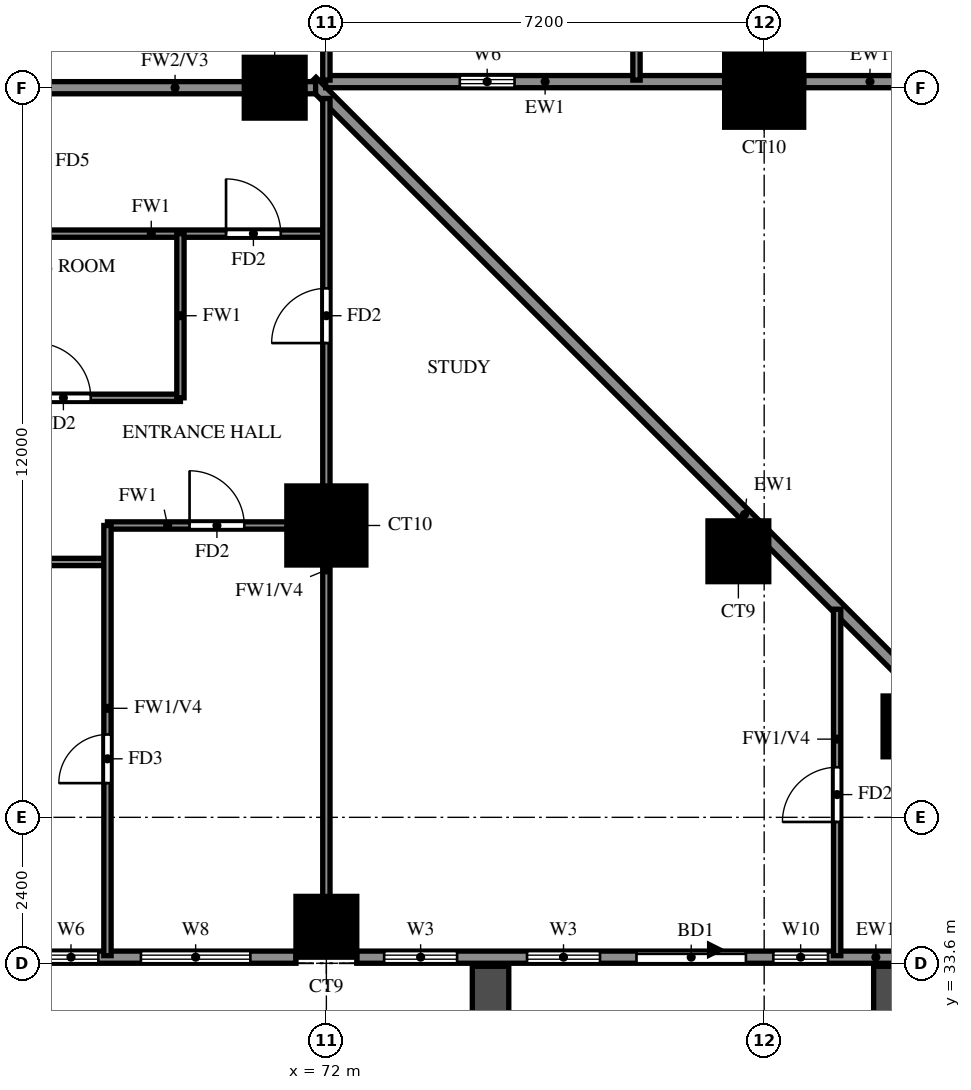
"""IFC4 building model, lengths in metres.
Left out: names, types, materials, properties, quantities, classifications, styles, units other than length and angle.
Written with IfcOpenShell. Run it as: python <this file> out.ifc"""

import sys

from ifc_helpers import new_model, si_unit, direction, frame, frame_2d, origin, origin_2d, place, context, subcontext, project, spatial, rectangle, extrude, source, transform, mapped, element, fill, save


model = new_model("IFC4")
c1 = context("Model", 3, precision=1e-05, world=origin(), true_north=direction((0.0, 1.0)))
c2 = subcontext(c1, "Body", "Model", "MODEL_VIEW")
j1 = project(units=[si_unit("LENGTHUNIT", "METRE"), si_unit("PLANEANGLEUNIT", "RADIAN")], contexts=[c1])
p1 = place(None, origin())
s1 = spatial("IfcSite", under=j1, at=p1, CompositionType="ELEMENT")
p2 = place(p1, origin())
s2 = spatial("IfcBuilding", under=s1, at=p2, CompositionType="ELEMENT")
p3 = place(p2, frame((0.0, 0.0, 79.5)))
s3 = spatial("IfcBuildingStorey", under=s2, at=p3, CompositionType="ELEMENT", Elevation=79.5)
m1 = source(origin(), c2, "Body", "SweptSolid", [
    extrude(rectangle(XDim=1.0, YDim=1.0, at=origin_2d()), origin(), (0.0, 0.0, 1.0), 3.18),
])
for number, where, z_axis, x_axis in (
    (1, (72.0, 34.2, 0.0), (0.0, 0.0, 1.0), (1.0, 0.0, 0.0)),
    (2, (81.656, 37.496, 0.0), (0.0, 0.0, 1.0), (1.0, 0.0, 0.0)),
    (3, (78.776, 40.376, 0.0), (0.0, 0.0, 1.0), (1.0, 0.0, 0.0)),
):
    element("IfcColumn", number, at=place(p3, frame(where, z_axis=z_axis, x_axis=x_axis)), inside=s3, PredefinedType="COLUMN", context=c2, shape_type="MappedRepresentation", body=[
        mapped(m1, transform((0.0, 0.0, 0.0))),
    ])
m2 = source(origin(), c2, "Body", "SweptSolid", [
    extrude(rectangle(XDim=1.3, YDim=1.3, at=origin_2d()), origin(), (0.0, 0.0, 1.0), 3.18),
])
p4 = place(p3, frame((72.0, 40.8, 0.0), z_axis=(0.0, 0.0, 1.0), x_axis=(1.0, 0.0, 0.0)))
e4 = element("IfcColumn", 4, at=p4, inside=s3, PredefinedType="COLUMN", context=c2, shape_type="MappedRepresentation", body=[
    mapped(m2, transform((0.0, 0.0, 0.0))),
])
p5 = place(p3, frame((71.15, 48.0, 0.0), z_axis=(0.0, 0.0, 1.0), x_axis=(1.0, 0.0, 0.0)))
e5 = element("IfcColumn", 5, at=p5, inside=s3, PredefinedType="COLUMN", context=c2, shape_type="MappedRepresentation", body=[
    mapped(m1, transform((0.0, 0.0, 0.0))),
])
p6 = place(p3, frame((79.2, 48.0, 0.0), z_axis=(0.0, 0.0, 1.0), x_axis=(1.0, 0.0, 0.0)))
e6 = element("IfcColumn", 6, at=p6, inside=s3, PredefinedType="COLUMN", context=c2, shape_type="MappedRepresentation", body=[
    mapped(m2, transform((0.0, 0.0, 0.0))),
])
p7 = place(p3, frame((85.996, 33.863, 0.0), z_axis=(0.0, 0.0, 1.0), x_axis=(-0.707100718496, 0.707112843825, 0.0)))
e7 = element("IfcWall", 7, at=p7, inside=s3, PredefinedType="SOLIDWALL", context=c2, shape_type="SweptSolid", body=[
    extrude(rectangle(XDim=20.135, YDim=0.2, at=frame_2d((10.067, 0.0))), origin(), (0.0, 0.0, 1.0), 3.18),
])
p8 = place(p3, frame((71.989, 48.1, 0.0), z_axis=(0.0, 0.0, 1.0), x_axis=(1.0, 0.0, 0.0)))
e8 = element("IfcWall", 8, at=p8, inside=s3, PredefinedType="SOLIDWALL", context=c2, shape_type="SweptSolid", body=[
    extrude(rectangle(XDim=6.562, YDim=0.2, at=frame_2d((3.281, 0.0))), origin(), (0.0, 0.0, 1.0), 3.18),
])
p9 = place(p8, frame((2.206, 0.0, 1.5)))
e9 = element("IfcOpeningElement", 9, at=p9, cuts=e8, PredefinedType="OPENING", context=c2, shape_type="SweptSolid", body=[
    extrude(rectangle(XDim=0.9, YDim=0.9, at=frame_2d((0.45, 0.45))), frame((0.0, 0.11, 0.0), z_axis=(0.0, -1.0, 0.0), x_axis=(1.0, 0.0, 0.0)), (0.0, 0.0, 1.0), 0.22),
])
p10 = place(p3, frame((79.85, 48.1, 0.0), z_axis=(0.0, 0.0, 1.0), x_axis=(1.0, 0.0, 0.0)))
e10 = element("IfcWall", 10, at=p10, inside=s3, PredefinedType="SOLIDWALL", context=c2, shape_type="SweptSolid", body=[
    extrude(rectangle(XDim=5.45, YDim=0.2, at=frame_2d((2.725, 0.0))), origin(), (0.0, 0.0, 1.0), 3.18),
])
p11 = place(p10, frame((1.525, 0.0, 0.6)))
e11 = element("IfcOpeningElement", 11, at=p11, cuts=e10, PredefinedType="OPENING", context=c2, shape_type="SweptSolid", body=[
    extrude(rectangle(XDim=2.4, YDim=2.4, at=frame_2d((1.2, 1.2))), frame((0.0, 0.11, 0.0), z_axis=(0.0, -1.0, 0.0), x_axis=(1.0, 0.0, 0.0)), (0.0, 0.0, 1.0), 0.22),
])
p12 = place(p3, frame((65.3, 33.7, 0.0), z_axis=(0.0, 0.0, 1.0), x_axis=(1.0, 0.0, 0.0)))
e12 = element("IfcWall", 12, at=p12, inside=s3, PredefinedType="SOLIDWALL", context=c2, shape_type="SweptSolid", body=[
    extrude(rectangle(XDim=6.2, YDim=0.2, at=frame_2d((3.1, 0.0))), origin(), (0.0, 0.0, 1.0), 3.18),
])
p13 = place(p12, frame((3.65, 0.0, 0.6)))
e13 = element("IfcOpeningElement", 13, at=p13, cuts=e12, PredefinedType="OPENING", context=c2, shape_type="SweptSolid", body=[
    extrude(rectangle(XDim=1.8, YDim=2.4, at=frame_2d((0.9, 1.2))), frame((0.0, 0.11, 0.0), z_axis=(0.0, -1.0, 0.0), x_axis=(1.0, 0.0, 0.0)), (0.0, 0.0, 1.0), 0.22),
])
p14 = place(p12, frame((0.3, 0.0, 1.5)))
e14 = element("IfcOpeningElement", 14, at=p14, cuts=e12, PredefinedType="OPENING", context=c2, shape_type="SweptSolid", body=[
    extrude(rectangle(XDim=0.9, YDim=0.9, at=frame_2d((0.45, 0.45))), frame((0.0, 0.11, 0.0), z_axis=(0.0, -1.0, 0.0), x_axis=(1.0, 0.0, 0.0)), (0.0, 0.0, 1.0), 0.22),
])
p15 = place(p12, frame((2.05, 0.0, 1.5)))
e15 = element("IfcOpeningElement", 15, at=p15, cuts=e12, PredefinedType="OPENING", context=c2, shape_type="SweptSolid", body=[
    extrude(rectangle(XDim=0.9, YDim=0.9, at=frame_2d((0.45, 0.45))), frame((0.0, 0.11, 0.0), z_axis=(0.0, -1.0, 0.0), x_axis=(1.0, 0.0, 0.0)), (0.0, 0.0, 1.0), 0.22),
])
p16 = place(p3, frame((72.5, 33.7, 0.0), z_axis=(0.0, 0.0, 1.0), x_axis=(1.0, 0.0, 0.0)))
e16 = element("IfcWall", 16, at=p16, inside=s3, PredefinedType="SOLIDWALL", context=c2, shape_type="SweptSolid", body=[
    extrude(rectangle(XDim=13.659, YDim=0.2, at=frame_2d((6.829, 0.0))), origin(), (0.0, 0.0, 1.0), 3.18),
])
p17 = place(p16, frame((4.6, 0.0, 0.0)))
e17 = element("IfcOpeningElement", 17, at=p17, cuts=e16, PredefinedType="OPENING", context=c2, shape_type="SweptSolid", body=[
    extrude(rectangle(XDim=1.8, YDim=2.4, at=frame_2d((0.9, 1.2))), frame((0.0, 0.11, 0.0), z_axis=(0.0, -1.0, 0.0), x_axis=(1.0, 0.0, 0.0)), (0.0, 0.0, 1.0), 0.22),
])
p18 = place(p16, frame((0.45, 0.0, 0.6)))
e18 = element("IfcOpeningElement", 18, at=p18, cuts=e16, PredefinedType="OPENING", context=c2, shape_type="SweptSolid", body=[
    extrude(rectangle(XDim=1.2, YDim=2.4, at=frame_2d((0.6, 1.2))), frame((0.0, 0.11, 0.0), z_axis=(0.0, -1.0, 0.0), x_axis=(1.0, 0.0, 0.0)), (0.0, 0.0, 1.0), 0.22),
])
p19 = place(p16, frame((2.8, 0.0, 0.6)))
e19 = element("IfcOpeningElement", 19, at=p19, cuts=e16, PredefinedType="OPENING", context=c2, shape_type="SweptSolid", body=[
    extrude(rectangle(XDim=1.2, YDim=2.4, at=frame_2d((0.6, 1.2))), frame((0.0, 0.11, 0.0), z_axis=(0.0, -1.0, 0.0), x_axis=(1.0, 0.0, 0.0)), (0.0, 0.0, 1.0), 0.22),
])
p20 = place(p16, frame((6.85, 0.0, 0.6)))
e20 = element("IfcOpeningElement", 20, at=p20, cuts=e16, PredefinedType="OPENING", context=c2, shape_type="SweptSolid", body=[
    extrude(rectangle(XDim=0.9, YDim=2.4, at=frame_2d((0.45, 1.2))), frame((0.0, 0.11, 0.0), z_axis=(0.0, -1.0, 0.0), x_axis=(1.0, 0.0, 0.0)), (0.0, 0.0, 1.0), 0.22),
])
p21 = place(p16, frame((10.079, 0.0, 0.6)))
e21 = element("IfcOpeningElement", 21, at=p21, cuts=e16, PredefinedType="OPENING", context=c2, shape_type="SweptSolid", body=[
    extrude(rectangle(XDim=2.4, YDim=2.4, at=frame_2d((1.2, 1.2))), frame((0.0, 0.11, 0.0), z_axis=(0.0, -1.0, 0.0), x_axis=(1.0, 0.0, 0.0)), (0.0, 0.0, 1.0), 0.22),
])
for number, where, z_axis, x_axis in (
    (22, (74.7, 33.55, 0.0), (0.0, 0.0, 1.0), (0.0, -1.0, 0.0)),
    (23, (81.3, 33.55, 0.0), (0.0, 0.0, 1.0), (0.0, -1.0, 0.0)),
):
    element("IfcWall", number, at=place(p3, frame(where, z_axis=z_axis, x_axis=x_axis)), inside=s3, PredefinedType="SOLIDWALL", context=c2, shape_type="SweptSolid", body=[
        extrude(rectangle(XDim=2.65, YDim=0.6, at=frame_2d((1.325, 0.0))), origin(), (0.0, 0.0, 1.0), 2.85),
    ])
p22 = place(p3, frame((67.2, 48.0, 0.0), z_axis=(0.0, 0.0, 1.0), x_axis=(1.0, 0.0, 0.0)))
e24 = element("IfcWall", 24, at=p22, inside=s3, PredefinedType="SOLIDWALL", context=c2, shape_type="SweptSolid", body=[
    extrude(rectangle(XDim=4.623, YDim=0.2, at=frame_2d((2.312, 0.0))), origin(), (0.0, 0.0, 1.0), 3.18),
])
p23 = place(p3, frame((64.8, 40.2, 0.0), z_axis=(0.0, 0.0, 1.0), x_axis=(1.0, 0.0, 0.0)))
e25 = element("IfcWall", 25, at=p23, inside=s3, PredefinedType="PARTITIONING", context=c2, shape_type="SweptSolid", body=[
    extrude(rectangle(XDim=3.6, YDim=0.12, at=frame_2d((1.8, 0.0))), origin(), (0.0, 0.0, 1.0), 3.18),
])
p24 = place(p3, frame((68.4, 40.8, 0.0), z_axis=(0.0, 0.0, 1.0), x_axis=(1.0, 0.0, 0.0)))
e26 = element("IfcWall", 26, at=p24, inside=s3, PredefinedType="PARTITIONING", context=c2, shape_type="SweptSolid", body=[
    extrude(rectangle(XDim=3.6, YDim=0.12, at=frame_2d((1.8, 0.0))), origin(), (0.0, 0.0, 1.0), 3.18),
])
p25 = place(p24, frame((1.35, 0.0, 0.0)))
e27 = element("IfcOpeningElement", 27, at=p25, cuts=e26, PredefinedType="OPENING", context=c2, shape_type="SweptSolid", body=[
    extrude(rectangle(XDim=0.9, YDim=2.1, at=frame_2d((0.45, 1.05))), frame((0.0, 0.07, 0.0), z_axis=(0.0, -1.0, 0.0), x_axis=(1.0, 0.0, 0.0)), (0.0, 0.0, 1.0), 0.14),
])
p26 = place(p3, frame((60.0, 42.9, 0.0), z_axis=(0.0, 0.0, 1.0), x_axis=(1.0, 0.0, 0.0)))
e28 = element("IfcWall", 28, at=p26, inside=s3, PredefinedType="PARTITIONING", context=c2, shape_type="SweptSolid", body=[
    extrude(rectangle(XDim=9.6, YDim=0.12, at=frame_2d((4.8, 0.0))), origin(), (0.0, 0.0, 1.0), 3.18),
])
p27 = place(p26, frame((7.225, 0.0, 0.0)))
e29 = element("IfcOpeningElement", 29, at=p27, cuts=e28, PredefinedType="OPENING", context=c2, shape_type="SweptSolid", body=[
    extrude(rectangle(XDim=0.9, YDim=2.1, at=frame_2d((0.45, 1.05))), frame((0.0, 0.07, 0.0), z_axis=(0.0, -1.0, 0.0), x_axis=(1.0, 0.0, 0.0)), (0.0, 0.0, 1.0), 0.14),
])
p28 = place(p26, frame((2.425, 0.0, 0.0)))
e30 = element("IfcOpeningElement", 30, at=p28, cuts=e28, PredefinedType="OPENING", context=c2, shape_type="SweptSolid", body=[
    extrude(rectangle(XDim=0.9, YDim=2.1, at=frame_2d((0.45, 1.05))), frame((0.0, 0.07, 0.0), z_axis=(0.0, -1.0, 0.0), x_axis=(1.0, 0.0, 0.0)), (0.0, 0.0, 1.0), 0.14),
])
p29 = place(p3, frame((67.2, 45.6, 0.0), z_axis=(0.0, 0.0, 1.0), x_axis=(1.0, 0.0, 0.0)))
e31 = element("IfcWall", 31, at=p29, inside=s3, PredefinedType="PARTITIONING", context=c2, shape_type="SweptSolid", body=[
    extrude(rectangle(XDim=4.8, YDim=0.12, at=frame_2d((2.4, 0.0))), origin(), (0.0, 0.0, 1.0), 3.18),
])
p30 = place(p29, frame((3.15, 0.0, 0.0)))
e32 = element("IfcOpeningElement", 32, at=p30, cuts=e31, PredefinedType="OPENING", context=c2, shape_type="SweptSolid", body=[
    extrude(rectangle(XDim=0.9, YDim=2.1, at=frame_2d((0.45, 1.05))), frame((0.0, 0.07, 0.0), z_axis=(0.0, -1.0, 0.0), x_axis=(1.0, 0.0, 0.0)), (0.0, 0.0, 1.0), 0.14),
])
p31 = place(p3, frame((68.4, 33.725, 0.0), z_axis=(0.0, 0.0, 1.0), x_axis=(0.0, 1.0, 0.0)))
e33 = element("IfcWall", 33, at=p31, inside=s3, PredefinedType="PARTITIONING", context=c2, shape_type="SweptSolid", body=[
    extrude(rectangle(XDim=7.075, YDim=0.12, at=frame_2d((3.538, 0.0))), origin(), (0.0, 0.0, 1.0), 2.28),
])
p32 = place(p31, frame((2.837, 0.0, 0.0)))
e34 = element("IfcOpeningElement", 34, at=p32, cuts=e33, PredefinedType="OPENING", context=c2, shape_type="SweptSolid", body=[
    extrude(rectangle(XDim=0.8, YDim=2.1, at=frame_2d((0.4, 1.05))), frame((0.0, 0.07, 0.0), z_axis=(0.0, -1.0, 0.0), x_axis=(1.0, 0.0, 0.0)), (0.0, 0.0, 1.0), 0.14),
])
p33 = place(p3, frame((69.6, 42.9, 0.0), z_axis=(0.0, 0.0, 1.0), x_axis=(0.0, 1.0, 0.0)))
e35 = element("IfcWall", 35, at=p33, inside=s3, PredefinedType="PARTITIONING", context=c2, shape_type="SweptSolid", body=[
    extrude(rectangle(XDim=2.7, YDim=0.12, at=frame_2d((1.35, 0.0))), origin(), (0.0, 0.0, 1.0), 3.18),
])
p34 = place(p3, frame((72.0, 33.725, 0.0), z_axis=(0.0, 0.0, 1.0), x_axis=(0.0, 1.0, 0.0)))
e36 = element("IfcWall", 36, at=p34, inside=s3, PredefinedType="PARTITIONING", context=c2, shape_type="SweptSolid", body=[
    extrude(rectangle(XDim=14.098, YDim=0.12, at=frame_2d((7.049, 0.0))), origin(), (0.0, 0.0, 1.0), 2.28),
])
p35 = place(p34, frame((10.075, 0.0, 0.0)))
e37 = element("IfcOpeningElement", 37, at=p35, cuts=e36, PredefinedType="OPENING", context=c2, shape_type="SweptSolid", body=[
    extrude(rectangle(XDim=0.9, YDim=2.1, at=frame_2d((0.45, 1.05))), frame((0.0, 0.07, 0.0), z_axis=(0.0, -1.0, 0.0), x_axis=(1.0, 0.0, 0.0)), (0.0, 0.0, 1.0), 0.14),
])
for number, where, z_axis, x_axis in (
    (38, (72.0, 48.125, 0.0), (0.0, 0.0, 1.0), (0.0, 1.0, 0.0)),
    (39, (77.1, 48.125, 0.0), (0.0, 0.0, 1.0), (0.0, 1.0, 0.0)),
):
    element("IfcWall", number, at=place(p3, frame(where, z_axis=z_axis, x_axis=x_axis)), inside=s3, PredefinedType="PARTITIONING", context=c2, shape_type="SweptSolid", body=[
        extrude(rectangle(XDim=3.475, YDim=0.12, at=frame_2d((1.738, 0.0))), origin(), (0.0, 0.0, 1.0), 3.18),
    ])
p36 = place(p3, frame((79.2, 48.125, 0.0), z_axis=(0.0, 0.0, 1.0), x_axis=(0.0, 1.0, 0.0)))
e40 = element("IfcWall", 40, at=p36, inside=s3, PredefinedType="PARTITIONING", context=c2, shape_type="SweptSolid", body=[
    extrude(rectangle(XDim=25.075, YDim=0.12, at=frame_2d((12.538, 0.0))), origin(), (0.0, 0.0, 1.0), 3.18),
])
p37 = place(p36, frame((2.788, 0.0, 0.0)))
e41 = element("IfcOpeningElement", 41, at=p37, cuts=e40, PredefinedType="OPENING", context=c2, shape_type="SweptSolid", body=[
    extrude(rectangle(XDim=1.5, YDim=2.1, at=frame_2d((0.75, 1.05))), frame((0.0, 0.07, 0.0), z_axis=(0.0, -1.0, 0.0), x_axis=(1.0, 0.0, 0.0)), (0.0, 0.0, 1.0), 0.14),
])
p38 = place(p36, frame((8.425, 0.0, 0.0)))
e42 = element("IfcOpeningElement", 42, at=p38, cuts=e40, PredefinedType="OPENING", context=c2, shape_type="SweptSolid", body=[
    extrude(rectangle(XDim=0.9, YDim=2.1, at=frame_2d((0.45, 1.05))), frame((0.0, 0.07, 0.0), z_axis=(0.0, -1.0, 0.0), x_axis=(1.0, 0.0, 0.0)), (0.0, 0.0, 1.0), 0.14),
])
p39 = place(p36, frame((12.025, 0.0, 0.0)))
e43 = element("IfcOpeningElement", 43, at=p39, cuts=e40, PredefinedType="OPENING", context=c2, shape_type="SweptSolid", body=[
    extrude(rectangle(XDim=0.9, YDim=2.1, at=frame_2d((0.45, 1.05))), frame((0.0, 0.07, 0.0), z_axis=(0.0, -1.0, 0.0), x_axis=(1.0, 0.0, 0.0)), (0.0, 0.0, 1.0), 0.14),
])
p40 = place(p36, frame((15.625, 0.0, 0.0)))
e44 = element("IfcOpeningElement", 44, at=p40, cuts=e40, PredefinedType="OPENING", context=c2, shape_type="SweptSolid", body=[
    extrude(rectangle(XDim=0.9, YDim=2.1, at=frame_2d((0.45, 1.05))), frame((0.0, 0.07, 0.0), z_axis=(0.0, -1.0, 0.0), x_axis=(1.0, 0.0, 0.0)), (0.0, 0.0, 1.0), 0.14),
])
p41 = place(p36, frame((19.225, 0.0, 0.0)))
e45 = element("IfcOpeningElement", 45, at=p41, cuts=e40, PredefinedType="OPENING", context=c2, shape_type="SweptSolid", body=[
    extrude(rectangle(XDim=0.9, YDim=2.1, at=frame_2d((0.45, 1.05))), frame((0.0, 0.07, 0.0), z_axis=(0.0, -1.0, 0.0), x_axis=(1.0, 0.0, 0.0)), (0.0, 0.0, 1.0), 0.14),
])
p42 = place(p36, frame((22.825, 0.0, 0.0)))
e46 = element("IfcOpeningElement", 46, at=p42, cuts=e40, PredefinedType="OPENING", context=c2, shape_type="SweptSolid", body=[
    extrude(rectangle(XDim=0.9, YDim=2.1, at=frame_2d((0.45, 1.05))), frame((0.0, 0.07, 0.0), z_axis=(0.0, -1.0, 0.0), x_axis=(1.0, 0.0, 0.0)), (0.0, 0.0, 1.0), 0.14),
])
p43 = place(p3, frame((80.4, 33.725, 0.0), z_axis=(0.0, 0.0, 1.0), x_axis=(0.0, 1.0, 0.0)))
e47 = element("IfcWall", 47, at=p43, inside=s3, PredefinedType="PARTITIONING", context=c2, shape_type="SweptSolid", body=[
    extrude(rectangle(XDim=5.698, YDim=0.12, at=frame_2d((2.849, 0.0))), origin(), (0.0, 0.0, 1.0), 2.28),
])
p44 = place(p43, frame((2.199, 0.0, 0.0)))
e48 = element("IfcOpeningElement", 48, at=p44, cuts=e47, PredefinedType="OPENING", context=c2, shape_type="SweptSolid", body=[
    extrude(rectangle(XDim=0.9, YDim=2.1, at=frame_2d((0.45, 1.05))), frame((0.0, 0.07, 0.0), z_axis=(0.0, -1.0, 0.0), x_axis=(1.0, 0.0, 0.0)), (0.0, 0.0, 1.0), 0.14),
])
p45 = place(p9, origin())
e49 = element("IfcWindow", 49, at=p45, inside=s3, PartitioningType="SINGLE_PANEL", PredefinedType="WINDOW", context=c2, shape_type="SweptSolid", body=[
    extrude(rectangle(XDim=0.9, YDim=0.9, at=frame_2d((0.45, 0.45))), frame((0.0, 0.03, 0.0), z_axis=(0.0, -1.0, 0.0), x_axis=(1.0, 0.0, 0.0)), (0.0, 0.0, 1.0), 0.06),
])
fill(e9, e49)
p46 = place(p13, origin())
e50 = element("IfcWindow", 50, at=p46, inside=s3, PartitioningType="DOUBLE_PANEL_VERTICAL", PredefinedType="WINDOW", context=c2, shape_type="SweptSolid", body=[
    extrude(rectangle(XDim=1.8, YDim=2.4, at=frame_2d((0.9, 1.2))), frame((0.0, 0.03, 0.0), z_axis=(0.0, -1.0, 0.0), x_axis=(1.0, 0.0, 0.0)), (0.0, 0.0, 1.0), 0.06),
])
fill(e13, e50)
p47 = place(p15, origin())
e51 = element("IfcWindow", 51, at=p47, inside=s3, PartitioningType="SINGLE_PANEL", PredefinedType="WINDOW", context=c2, shape_type="SweptSolid", body=[
    extrude(rectangle(XDim=0.9, YDim=0.9, at=frame_2d((0.45, 0.45))), frame((0.0, 0.03, 0.0), z_axis=(0.0, -1.0, 0.0), x_axis=(1.0, 0.0, 0.0)), (0.0, 0.0, 1.0), 0.06),
])
fill(e15, e51)
p48 = place(p17, origin())
e52 = element("IfcDoor", 52, at=p48, inside=s3, OperationType="DOUBLE_DOOR_SLIDING", PredefinedType="DOOR", context=c2, shape_type="SweptSolid", body=[
    extrude(rectangle(XDim=1.8, YDim=2.4, at=frame_2d((0.9, 1.2))), frame((0.0, 0.025, 0.0), z_axis=(0.0, -1.0, 0.0), x_axis=(1.0, 0.0, 0.0)), (0.0, 0.0, 1.0), 0.05),
])
fill(e17, e52)
p49 = place(p18, origin())
e53 = element("IfcWindow", 53, at=p49, inside=s3, PartitioningType="SINGLE_PANEL", PredefinedType="WINDOW", context=c2, shape_type="SweptSolid", body=[
    extrude(rectangle(XDim=1.2, YDim=2.4, at=frame_2d((0.6, 1.2))), frame((0.0, 0.03, 0.0), z_axis=(0.0, -1.0, 0.0), x_axis=(1.0, 0.0, 0.0)), (0.0, 0.0, 1.0), 0.06),
])
fill(e18, e53)
p50 = place(p19, origin())
e54 = element("IfcWindow", 54, at=p50, inside=s3, PartitioningType="SINGLE_PANEL", PredefinedType="WINDOW", context=c2, shape_type="SweptSolid", body=[
    extrude(rectangle(XDim=1.2, YDim=2.4, at=frame_2d((0.6, 1.2))), frame((0.0, 0.03, 0.0), z_axis=(0.0, -1.0, 0.0), x_axis=(1.0, 0.0, 0.0)), (0.0, 0.0, 1.0), 0.06),
])
fill(e19, e54)
p51 = place(p20, origin())
e55 = element("IfcWindow", 55, at=p51, inside=s3, PartitioningType="SINGLE_PANEL", PredefinedType="WINDOW", context=c2, shape_type="SweptSolid", body=[
    extrude(rectangle(XDim=0.9, YDim=2.4, at=frame_2d((0.45, 1.2))), frame((0.0, 0.03, 0.0), z_axis=(0.0, -1.0, 0.0), x_axis=(1.0, 0.0, 0.0)), (0.0, 0.0, 1.0), 0.06),
])
fill(e20, e55)
p52 = place(p30, origin())
e56 = element("IfcDoor", 56, at=p52, inside=s3, OperationType="SINGLE_SWING_LEFT", PredefinedType="DOOR", context=c2, shape_type="SweptSolid", body=[
    extrude(rectangle(XDim=0.9, YDim=2.1, at=frame_2d((0.45, 1.05))), frame((0.0, 0.025, 0.0), z_axis=(0.0, -1.0, 0.0), x_axis=(1.0, 0.0, 0.0)), (0.0, 0.0, 1.0), 0.05),
])
fill(e32, e56)
p53 = place(p25, origin())
e57 = element("IfcDoor", 57, at=p53, inside=s3, OperationType="SINGLE_SWING_LEFT", PredefinedType="DOOR", context=c2, shape_type="SweptSolid", body=[
    extrude(rectangle(XDim=0.9, YDim=2.1, at=frame_2d((0.45, 1.05))), frame((0.0, 0.025, 0.0), z_axis=(0.0, -1.0, 0.0), x_axis=(1.0, 0.0, 0.0)), (0.0, 0.0, 1.0), 0.05),
])
fill(e27, e57)
p54 = place(p32, origin())
e58 = element("IfcDoor", 58, at=p54, inside=s3, OperationType="SINGLE_SWING_LEFT", PredefinedType="DOOR", context=c2, shape_type="SweptSolid", body=[
    extrude(rectangle(XDim=0.8, YDim=2.1, at=frame_2d((0.4, 1.05))), frame((0.0, 0.025, 0.0), z_axis=(0.0, -1.0, 0.0), x_axis=(1.0, 0.0, 0.0)), (0.0, 0.0, 1.0), 0.05),
])
fill(e34, e58)
p55 = place(p27, origin())
e59 = element("IfcDoor", 59, at=p55, inside=s3, OperationType="SINGLE_SWING_LEFT", PredefinedType="DOOR", context=c2, shape_type="SweptSolid", body=[
    extrude(rectangle(XDim=0.9, YDim=2.1, at=frame_2d((0.45, 1.05))), frame((0.0, 0.025, 0.0), z_axis=(0.0, -1.0, 0.0), x_axis=(1.0, 0.0, 0.0)), (0.0, 0.0, 1.0), 0.05),
])
fill(e29, e59)
p56 = place(p35, origin())
e60 = element("IfcDoor", 60, at=p56, inside=s3, OperationType="SINGLE_SWING_RIGHT", PredefinedType="DOOR", context=c2, shape_type="SweptSolid", body=[
    extrude(rectangle(XDim=0.9, YDim=2.1, at=frame_2d((0.45, 1.05))), frame((0.0, 0.025, 0.0), z_axis=(0.0, -1.0, 0.0), x_axis=(1.0, 0.0, 0.0)), (0.0, 0.0, 1.0), 0.05),
])
fill(e37, e60)
p57 = place(p44, origin())
e61 = element("IfcDoor", 61, at=p57, inside=s3, OperationType="SINGLE_SWING_RIGHT", PredefinedType="DOOR", context=c2, shape_type="SweptSolid", body=[
    extrude(rectangle(XDim=0.9, YDim=2.1, at=frame_2d((0.45, 1.05))), frame((0.0, 0.025, 0.0), z_axis=(0.0, -1.0, 0.0), x_axis=(1.0, 0.0, 0.0)), (0.0, 0.0, 1.0), 0.05),
])
fill(e48, e61)
save(model, sys.argv[1])
